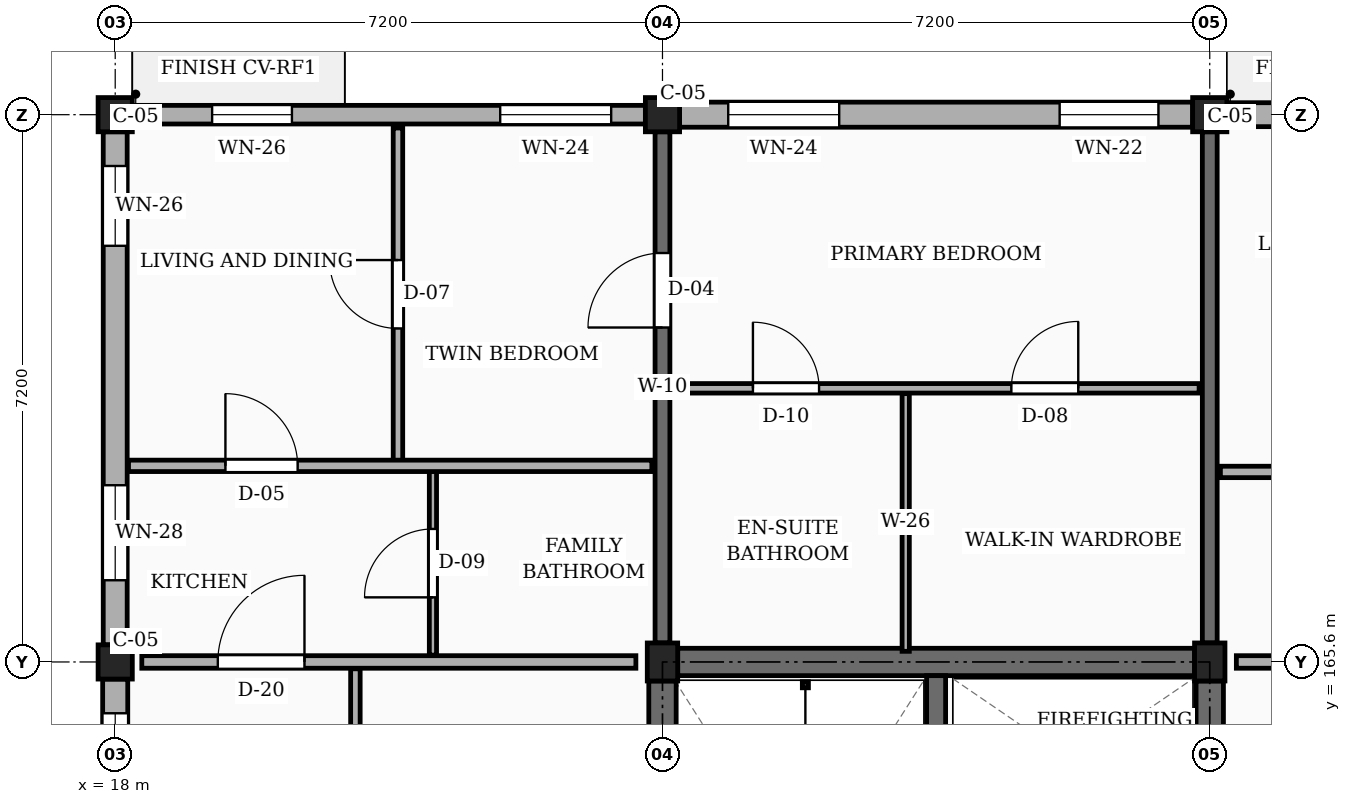
"""IFC4 building model, lengths in metres.
Left out: names, types, materials, properties, quantities, classifications, styles, units other than length and angle.
Written with IfcOpenShell. Run it as: python <this file> out.ifc"""

import sys

from ifc_helpers import new_model, si_unit, direction, frame, frame_2d, origin, origin_2d, place, context, subcontext, project, spatial, rectangle, extrude, element, fill, save


model = new_model("IFC4")
c1 = context("Model", 3, precision=1e-05, world=origin(), true_north=direction((0.0, 1.0)))
c2 = subcontext(c1, "Body", "Model", "MODEL_VIEW")
j1 = project(units=[si_unit("LENGTHUNIT", "METRE"), si_unit("PLANEANGLEUNIT", "RADIAN")], contexts=[c1])
p1 = place(None, origin())
s1 = spatial("IfcSite", under=j1, at=p1, CompositionType="ELEMENT")
p2 = place(p1, origin())
s2 = spatial("IfcBuilding", under=s1, at=p2, CompositionType="ELEMENT")
p3 = place(p2, frame((0.0, 0.0, 42.3)))
s3 = spatial("IfcBuildingStorey", under=s2, at=p3, CompositionType="ELEMENT", Elevation=42.3)
for number, where, z_axis, x_axis in (
    (1, (18.0, 165.6, 0.0), (0.0, 0.0, 1.0), (1.0, 0.0, 0.0)),
    (2, (18.0, 172.8, 0.0), (0.0, 0.0, 1.0), (1.0, 0.0, 0.0)),
):
    element("IfcColumn", number, at=place(p3, frame(where, z_axis=z_axis, x_axis=x_axis)), inside=s3, PredefinedType="COLUMN", context=c2, shape_type="SweptSolid", body=[
        extrude(rectangle(XDim=0.45, YDim=0.45, at=origin_2d()), origin(), (0.0, 0.0, 1.0), 3.15),
    ])
p4 = place(p3, frame((25.2, 165.6, 0.0), z_axis=(0.0, 0.0, 1.0), x_axis=(1.0, 0.0, 0.0)))
e3 = element("IfcColumn", 3, at=p4, inside=s3, PredefinedType="COLUMN", context=c2, shape_type="SweptSolid", body=[
    extrude(rectangle(XDim=0.4, YDim=0.5, at=origin_2d()), origin(), (0.0, 0.0, 1.0), 3.15),
])
p5 = place(p3, frame((25.2, 172.8, 0.0), z_axis=(0.0, 0.0, 1.0), x_axis=(1.0, 0.0, 0.0)))
e4 = element("IfcColumn", 4, at=p5, inside=s3, PredefinedType="COLUMN", context=c2, shape_type="SweptSolid", body=[
    extrude(rectangle(XDim=0.45, YDim=0.45, at=origin_2d()), origin(), (0.0, 0.0, 1.0), 3.15),
])
p6 = place(p3, frame((32.4, 165.6, 0.0), z_axis=(0.0, 0.0, 1.0), x_axis=(1.0, 0.0, 0.0)))
e5 = element("IfcColumn", 5, at=p6, inside=s3, PredefinedType="COLUMN", context=c2, shape_type="SweptSolid", body=[
    extrude(rectangle(XDim=0.4, YDim=0.5, at=origin_2d()), origin(), (0.0, 0.0, 1.0), 3.15),
])
p7 = place(p3, frame((32.4, 172.8, 0.0), z_axis=(0.0, 0.0, 1.0), x_axis=(1.0, 0.0, 0.0)))
e6 = element("IfcColumn", 6, at=p7, inside=s3, PredefinedType="COLUMN", context=c2, shape_type="SweptSolid", body=[
    extrude(rectangle(XDim=0.45, YDim=0.45, at=origin_2d()), origin(), (0.0, 0.0, 1.0), 3.15),
])
p8 = place(p3, frame((25.2, 165.85, 0.0), z_axis=(0.0, 0.0, 1.0), x_axis=(0.0, 1.0, 0.0)))
e7 = element("IfcWall", 7, at=p8, inside=s3, PredefinedType="SOLIDWALL", context=c2, shape_type="SweptSolid", body=[
    extrude(rectangle(XDim=6.725, YDim=0.195, at=frame_2d((3.362, 0.0))), origin(), (0.0, 0.0, 1.0), 2.22),
])
p9 = place(p8, frame((4.15, 0.0, 0.0)))
e8 = element("IfcOpeningElement", 8, at=p9, cuts=e7, PredefinedType="OPENING", context=c2, shape_type="SweptSolid", body=[
    extrude(rectangle(XDim=0.98, YDim=2.12, at=frame_2d((0.49, 1.06))), frame((0.0, 0.107, 0.0), z_axis=(0.0, -1.0, 0.0), x_axis=(1.0, 0.0, 0.0)), (0.0, 0.0, 1.0), 0.215),
])
p10 = place(p3, frame((32.4, 165.85, 0.0), z_axis=(0.0, 0.0, 1.0), x_axis=(0.0, 1.0, 0.0)))
e9 = element("IfcWall", 9, at=p10, inside=s3, PredefinedType="SOLIDWALL", context=c2, shape_type="SweptSolid", body=[
    extrude(rectangle(XDim=6.725, YDim=0.195, at=frame_2d((3.362, 0.0))), origin(), (0.0, 0.0, 1.0), 2.22),
])
p11 = place(p3, frame((39.375, 172.8, 0.0), z_axis=(0.0, 0.0, 1.0), x_axis=(-1.0, 0.0, 0.0)))
e10 = element("IfcWall", 10, at=p11, inside=s3, PredefinedType="SOLIDWALL", context=c2, shape_type="SweptSolid", body=[
    extrude(rectangle(XDim=6.75, YDim=0.315, at=frame_2d((3.375, 0.0))), origin(), (0.0, 0.0, 1.0), 2.46),
])
p12 = place(p11, frame((0.45, 0.0, 0.78)))
e11 = element("IfcOpeningElement", 11, at=p12, cuts=e10, PredefinedType="OPENING", context=c2, shape_type="SweptSolid", body=[
    extrude(rectangle(XDim=1.14, YDim=1.36, at=frame_2d((0.57, 0.68))), frame((0.0, 0.167, 0.0), z_axis=(0.0, -1.0, 0.0), x_axis=(1.0, 0.0, 0.0)), (0.0, 0.0, 1.0), 0.335),
])
p13 = place(p11, frame((4.65, 0.0, 0.78)))
e12 = element("IfcOpeningElement", 12, at=p13, cuts=e10, PredefinedType="OPENING", context=c2, shape_type="SweptSolid", body=[
    extrude(rectangle(XDim=1.3, YDim=1.36, at=frame_2d((0.65, 0.68))), frame((0.0, 0.167, 0.0), z_axis=(0.0, -1.0, 0.0), x_axis=(1.0, 0.0, 0.0)), (0.0, 0.0, 1.0), 0.335),
])
p14 = place(p3, frame((32.175, 172.8, 0.0), z_axis=(0.0, 0.0, 1.0), x_axis=(-1.0, 0.0, 0.0)))
e13 = element("IfcWall", 13, at=p14, inside=s3, PredefinedType="SOLIDWALL", context=c2, shape_type="SweptSolid", body=[
    extrude(rectangle(XDim=6.75, YDim=0.33, at=frame_2d((3.375, 0.0))), origin(), (0.0, 0.0, 1.0), 2.46),
])
p15 = place(p14, frame((0.45, 0.0, 0.78)))
e14 = element("IfcOpeningElement", 14, at=p15, cuts=e13, PredefinedType="OPENING", context=c2, shape_type="SweptSolid", body=[
    extrude(rectangle(XDim=1.3, YDim=1.36, at=frame_2d((0.65, 0.68))), frame((0.0, 0.175, 0.0), z_axis=(0.0, -1.0, 0.0), x_axis=(1.0, 0.0, 0.0)), (0.0, 0.0, 1.0), 0.35),
])
p16 = place(p14, frame((4.65, 0.0, 0.78)))
e15 = element("IfcOpeningElement", 15, at=p16, cuts=e13, PredefinedType="OPENING", context=c2, shape_type="SweptSolid", body=[
    extrude(rectangle(XDim=1.46, YDim=1.36, at=frame_2d((0.73, 0.68))), frame((0.0, 0.175, 0.0), z_axis=(0.0, -1.0, 0.0), x_axis=(1.0, 0.0, 0.0)), (0.0, 0.0, 1.0), 0.35),
])
p17 = place(p3, frame((24.975, 172.8, 0.0), z_axis=(0.0, 0.0, 1.0), x_axis=(-1.0, 0.0, 0.0)))
e16 = element("IfcWall", 16, at=p17, inside=s3, PredefinedType="SOLIDWALL", context=c2, shape_type="SweptSolid", body=[
    extrude(rectangle(XDim=6.75, YDim=0.245, at=frame_2d((3.375, 0.0))), origin(), (0.0, 0.0, 1.0), 2.46),
])
p18 = place(p17, frame((0.45, 0.0, 0.78)))
e17 = element("IfcOpeningElement", 17, at=p18, cuts=e16, PredefinedType="OPENING", context=c2, shape_type="SweptSolid", body=[
    extrude(rectangle(XDim=1.46, YDim=1.36, at=frame_2d((0.73, 0.68))), frame((0.0, 0.133, 0.0), z_axis=(0.0, -1.0, 0.0), x_axis=(1.0, 0.0, 0.0)), (0.0, 0.0, 1.0), 0.265),
])
p19 = place(p17, frame((4.65, 0.0, 0.78)))
e18 = element("IfcOpeningElement", 18, at=p19, cuts=e16, PredefinedType="OPENING", context=c2, shape_type="SweptSolid", body=[
    extrude(rectangle(XDim=1.05, YDim=1.44, at=frame_2d((0.525, 0.72))), frame((0.0, 0.133, 0.0), z_axis=(0.0, -1.0, 0.0), x_axis=(1.0, 0.0, 0.0)), (0.0, 0.0, 1.0), 0.265),
])
p20 = place(p3, frame((18.0, 172.575, 0.0), z_axis=(0.0, 0.0, 1.0), x_axis=(0.0, -1.0, 0.0)))
e19 = element("IfcWall", 19, at=p20, inside=s3, PredefinedType="SOLIDWALL", context=c2, shape_type="SweptSolid", body=[
    extrude(rectangle(XDim=6.75, YDim=0.315, at=frame_2d((3.375, 0.0))), origin(), (0.0, 0.0, 1.0), 2.46),
])
p21 = place(p20, frame((0.45, 0.0, 0.78)))
e20 = element("IfcOpeningElement", 20, at=p21, cuts=e19, PredefinedType="OPENING", context=c2, shape_type="SweptSolid", body=[
    extrude(rectangle(XDim=1.05, YDim=1.44, at=frame_2d((0.525, 0.72))), frame((0.0, 0.167, 0.0), z_axis=(0.0, -1.0, 0.0), x_axis=(1.0, 0.0, 0.0)), (0.0, 0.0, 1.0), 0.335),
])
p22 = place(p20, frame((4.65, 0.0, 0.78)))
e21 = element("IfcOpeningElement", 21, at=p22, cuts=e19, PredefinedType="OPENING", context=c2, shape_type="SweptSolid", body=[
    extrude(rectangle(XDim=1.25, YDim=1.44, at=frame_2d((0.625, 0.72))), frame((0.0, 0.167, 0.0), z_axis=(0.0, -1.0, 0.0), x_axis=(1.0, 0.0, 0.0)), (0.0, 0.0, 1.0), 0.335),
])
p23 = place(p3, frame((18.0, 165.375, 0.0), z_axis=(0.0, 0.0, 1.0), x_axis=(0.0, -1.0, 0.0)))
e22 = element("IfcWall", 22, at=p23, inside=s3, PredefinedType="SOLIDWALL", context=c2, shape_type="SweptSolid", body=[
    extrude(rectangle(XDim=6.75, YDim=0.33, at=frame_2d((3.375, 0.0))), origin(), (0.0, 0.0, 1.0), 2.46),
])
p24 = place(p23, frame((0.45, 0.0, 0.78)))
e23 = element("IfcOpeningElement", 23, at=p24, cuts=e22, PredefinedType="OPENING", context=c2, shape_type="SweptSolid", body=[
    extrude(rectangle(XDim=1.25, YDim=1.44, at=frame_2d((0.625, 0.72))), frame((0.0, 0.175, 0.0), z_axis=(0.0, -1.0, 0.0), x_axis=(1.0, 0.0, 0.0)), (0.0, 0.0, 1.0), 0.35),
])
p25 = place(p23, frame((4.65, 0.0, 0.78)))
e24 = element("IfcOpeningElement", 24, at=p25, cuts=e22, PredefinedType="OPENING", context=c2, shape_type="SweptSolid", body=[
    extrude(rectangle(XDim=1.45, YDim=1.44, at=frame_2d((0.725, 0.72))), frame((0.0, 0.175, 0.0), z_axis=(0.0, -1.0, 0.0), x_axis=(1.0, 0.0, 0.0)), (0.0, 0.0, 1.0), 0.35),
])
p26 = place(p3, frame((25.2, 158.65, 0.0), z_axis=(0.0, 0.0, 1.0), x_axis=(0.0, 1.0, 0.0)))
e25 = element("IfcWall", 25, at=p26, inside=s3, PredefinedType="SHEAR", context=c2, shape_type="SweptSolid", body=[
    extrude(rectangle(XDim=6.7, YDim=0.36, at=frame_2d((3.35, 0.0))), origin(), (0.0, 0.0, 1.0), 2.89),
])
p27 = place(p3, frame((25.4, 165.6, 0.0), z_axis=(0.0, 0.0, 1.0), x_axis=(1.0, 0.0, 0.0)))
e26 = element("IfcWall", 26, at=p27, inside=s3, PredefinedType="SHEAR", context=c2, shape_type="SweptSolid", body=[
    extrude(rectangle(XDim=6.8, YDim=0.36, at=frame_2d((3.4, 0.0))), origin(), (0.0, 0.0, 1.0), 2.89),
])
p28 = place(p3, frame((32.4, 158.65, 0.0), z_axis=(0.0, 0.0, 1.0), x_axis=(0.0, 1.0, 0.0)))
e27 = element("IfcWall", 27, at=p28, inside=s3, PredefinedType="SHEAR", context=c2, shape_type="SweptSolid", body=[
    extrude(rectangle(XDim=6.7, YDim=0.36, at=frame_2d((3.35, 0.0))), origin(), (0.0, 0.0, 1.0), 2.89),
])
p29 = place(p3, frame((28.8, 158.58, 0.0), z_axis=(0.0, 0.0, 1.0), x_axis=(0.0, 1.0, 0.0)))
e28 = element("IfcWall", 28, at=p29, inside=s3, PredefinedType="SHEAR", context=c2, shape_type="SweptSolid", body=[
    extrude(rectangle(XDim=6.84, YDim=0.25, at=frame_2d((3.42, 0.0))), origin(), (0.0, 0.0, 1.0), 2.89),
])
p30 = place(p29, frame((0.42, 0.0, 0.0)))
e29 = element("IfcOpeningElement", 29, at=p30, cuts=e28, PredefinedType="OPENING", context=c2, shape_type="SweptSolid", body=[
    extrude(rectangle(XDim=1.05, YDim=2.15, at=frame_2d((0.525, 1.075))), frame((0.0, 0.135, 0.0), z_axis=(0.0, -1.0, 0.0), x_axis=(1.0, 0.0, 0.0)), (0.0, 0.0, 1.0), 0.27),
])
p31 = place(p3, frame((18.35, 165.6, 0.0), z_axis=(0.0, 0.0, 1.0), x_axis=(1.0, 0.0, 0.0)))
e30 = element("IfcWall", 30, at=p31, inside=s3, PredefinedType="PARTITIONING", context=c2, shape_type="SweptSolid", body=[
    extrude(rectangle(XDim=6.5, YDim=0.165, at=frame_2d((3.25, 0.0))), origin(), (0.0, 0.0, 1.0), 2.325),
])
p32 = place(p31, frame((1.0, 0.0, 0.0)))
e31 = element("IfcOpeningElement", 31, at=p32, cuts=e30, PredefinedType="OPENING", context=c2, shape_type="SweptSolid", body=[
    extrude(rectangle(XDim=1.14, YDim=2.18, at=frame_2d((0.57, 1.09))), frame((0.0, 0.093, 0.0), z_axis=(0.0, -1.0, 0.0), x_axis=(1.0, 0.0, 0.0)), (0.0, 0.0, 1.0), 0.185),
])
p33 = place(p3, frame((32.75, 165.6, 0.0), z_axis=(0.0, 0.0, 1.0), x_axis=(1.0, 0.0, 0.0)))
e32 = element("IfcWall", 32, at=p33, inside=s3, PredefinedType="PARTITIONING", context=c2, shape_type="SweptSolid", body=[
    extrude(rectangle(XDim=6.5, YDim=0.165, at=frame_2d((3.25, 0.0))), origin(), (0.0, 0.0, 1.0), 2.325),
])
p34 = place(p33, frame((1.0, 0.0, 0.0)))
e33 = element("IfcOpeningElement", 33, at=p34, cuts=e32, PredefinedType="OPENING", context=c2, shape_type="SweptSolid", body=[
    extrude(rectangle(XDim=1.0, YDim=2.15, at=frame_2d((0.5, 1.075))), frame((0.0, 0.093, 0.0), z_axis=(0.0, -1.0, 0.0), x_axis=(1.0, 0.0, 0.0)), (0.0, 0.0, 1.0), 0.185),
])
p35 = place(p3, frame((21.16, 158.49, 0.0), z_axis=(0.0, 0.0, 1.0), x_axis=(0.0, 1.0, 0.0)))
e34 = element("IfcWall", 34, at=p35, inside=s3, PredefinedType="PARTITIONING", context=c2, shape_type="SweptSolid", body=[
    extrude(rectangle(XDim=7.02, YDim=0.125, at=frame_2d((3.51, 0.0))), origin(), (0.0, 0.0, 1.0), 2.325),
])
p36 = place(p35, frame((2.85, 0.0, 0.0)))
e35 = element("IfcOpeningElement", 35, at=p36, cuts=e34, PredefinedType="OPENING", context=c2, shape_type="SweptSolid", body=[
    extrude(rectangle(XDim=1.02, YDim=2.15, at=frame_2d((0.51, 1.075))), frame((0.0, 0.073, 0.0), z_axis=(0.0, -1.0, 0.0), x_axis=(1.0, 0.0, 0.0)), (0.0, 0.0, 1.0), 0.145),
])
p37 = place(p3, frame((21.72, 168.25, 0.0), z_axis=(0.0, 0.0, 1.0), x_axis=(0.0, 1.0, 0.0)))
e36 = element("IfcWall", 36, at=p37, inside=s3, PredefinedType="PARTITIONING", context=c2, shape_type="SweptSolid", body=[
    extrude(rectangle(XDim=4.375, YDim=0.125, at=frame_2d((2.188, 0.0))), origin(), (0.0, 0.0, 1.0), 2.325),
])
p38 = place(p37, frame((1.738, 0.0, 0.0)))
e37 = element("IfcOpeningElement", 37, at=p38, cuts=e36, PredefinedType="OPENING", context=c2, shape_type="SweptSolid", body=[
    extrude(rectangle(XDim=0.9, YDim=2.1, at=frame_2d((0.45, 1.05))), frame((0.0, 0.073, 0.0), z_axis=(0.0, -1.0, 0.0), x_axis=(1.0, 0.0, 0.0)), (0.0, 0.0, 1.0), 0.145),
])
p39 = place(p3, frame((22.18, 165.69, 0.0), z_axis=(0.0, 0.0, 1.0), x_axis=(0.0, 1.0, 0.0)))
e38 = element("IfcWall", 38, at=p39, inside=s3, PredefinedType="PARTITIONING", context=c2, shape_type="SweptSolid", body=[
    extrude(rectangle(XDim=2.42, YDim=0.095, at=frame_2d((1.21, 0.0))), origin(), (0.0, 0.0, 1.0), 2.325),
])
p40 = place(p39, frame((0.76, 0.0, 0.0)))
e39 = element("IfcOpeningElement", 39, at=p40, cuts=e38, PredefinedType="OPENING", context=c2, shape_type="SweptSolid", body=[
    extrude(rectangle(XDim=0.9, YDim=2.05, at=frame_2d((0.45, 1.025))), frame((0.0, 0.058, 0.0), z_axis=(0.0, -1.0, 0.0), x_axis=(1.0, 0.0, 0.0)), (0.0, 0.0, 1.0), 0.115),
])
p41 = place(p3, frame((18.175, 168.18, 0.0), z_axis=(0.0, 0.0, 1.0), x_axis=(1.0, 0.0, 0.0)))
e40 = element("IfcWall", 40, at=p41, inside=s3, PredefinedType="PARTITIONING", context=c2, shape_type="SweptSolid", body=[
    extrude(rectangle(XDim=6.885, YDim=0.15, at=frame_2d((3.442, 0.0))), origin(), (0.0, 0.0, 1.0), 2.325),
])
p42 = place(p41, frame((1.275, 0.0, 0.0)))
e41 = element("IfcOpeningElement", 41, at=p42, cuts=e40, PredefinedType="OPENING", context=c2, shape_type="SweptSolid", body=[
    extrude(rectangle(XDim=0.95, YDim=2.1, at=frame_2d((0.475, 1.05))), frame((0.0, 0.085, 0.0), z_axis=(0.0, -1.0, 0.0), x_axis=(1.0, 0.0, 0.0)), (0.0, 0.0, 1.0), 0.17),
])
p43 = place(p3, frame((25.34, 169.2, 0.0), z_axis=(0.0, 0.0, 1.0), x_axis=(1.0, 0.0, 0.0)))
e42 = element("IfcWall", 42, at=p43, inside=s3, PredefinedType="PARTITIONING", context=c2, shape_type="SweptSolid", body=[
    extrude(rectangle(XDim=6.92, YDim=0.125, at=frame_2d((3.46, 0.0))), origin(), (0.0, 0.0, 1.0), 2.325),
])
p44 = place(p43, frame((1.05, 0.0, 0.0)))
e43 = element("IfcOpeningElement", 43, at=p44, cuts=e42, PredefinedType="OPENING", context=c2, shape_type="SweptSolid", body=[
    extrude(rectangle(XDim=0.87, YDim=2.05, at=frame_2d((0.435, 1.025))), frame((0.0, 0.073, 0.0), z_axis=(0.0, -1.0, 0.0), x_axis=(1.0, 0.0, 0.0)), (0.0, 0.0, 1.0), 0.145),
])
p45 = place(p43, frame((4.45, 0.0, 0.0)))
e44 = element("IfcOpeningElement", 44, at=p45, cuts=e42, PredefinedType="OPENING", context=c2, shape_type="SweptSolid", body=[
    extrude(rectangle(XDim=0.88, YDim=2.08, at=frame_2d((0.44, 1.04))), frame((0.0, 0.073, 0.0), z_axis=(0.0, -1.0, 0.0), x_axis=(1.0, 0.0, 0.0)), (0.0, 0.0, 1.0), 0.145),
])
p46 = place(p3, frame((28.4, 165.74, 0.0), z_axis=(0.0, 0.0, 1.0), x_axis=(0.0, 1.0, 0.0)))
e45 = element("IfcWall", 45, at=p46, inside=s3, PredefinedType="PARTITIONING", context=c2, shape_type="SweptSolid", body=[
    extrude(rectangle(XDim=3.39, YDim=0.095, at=frame_2d((1.695, 0.0))), origin(), (0.0, 0.0, 1.0), 2.325),
])
p47 = place(p3, frame((32.54, 168.1, 0.0), z_axis=(0.0, 0.0, 1.0), x_axis=(1.0, 0.0, 0.0)))
e46 = element("IfcWall", 46, at=p47, inside=s3, PredefinedType="PARTITIONING", context=c2, shape_type="SweptSolid", body=[
    extrude(rectangle(XDim=6.92, YDim=0.15, at=frame_2d((3.46, 0.0))), origin(), (0.0, 0.0, 1.0), 2.325),
])
p48 = place(p47, frame((1.31, 0.0, 0.0)))
e47 = element("IfcOpeningElement", 47, at=p48, cuts=e46, PredefinedType="OPENING", context=c2, shape_type="SweptSolid", body=[
    extrude(rectangle(XDim=0.95, YDim=2.1, at=frame_2d((0.475, 1.05))), frame((0.0, 0.085, 0.0), z_axis=(0.0, -1.0, 0.0), x_axis=(1.0, 0.0, 0.0)), (0.0, 0.0, 1.0), 0.17),
])
p49 = place(p15, origin())
e48 = element("IfcWindow", 48, at=p49, inside=s3, PartitioningType="SINGLE_PANEL", PredefinedType="WINDOW", context=c2, shape_type="SweptSolid", body=[
    extrude(rectangle(XDim=1.3, YDim=1.36, at=frame_2d((0.65, 0.68))), frame((0.0, 0.03, 0.0), z_axis=(0.0, -1.0, 0.0), x_axis=(1.0, 0.0, 0.0)), (0.0, 0.0, 1.0), 0.06),
])
fill(e14, e48)
p50 = place(p16, origin())
e49 = element("IfcWindow", 49, at=p50, inside=s3, PartitioningType="SINGLE_PANEL", PredefinedType="WINDOW", context=c2, shape_type="SweptSolid", body=[
    extrude(rectangle(XDim=1.46, YDim=1.36, at=frame_2d((0.73, 0.68))), frame((0.0, 0.03, 0.0), z_axis=(0.0, -1.0, 0.0), x_axis=(1.0, 0.0, 0.0)), (0.0, 0.0, 1.0), 0.06),
])
fill(e15, e49)
p51 = place(p18, origin())
e50 = element("IfcWindow", 50, at=p51, inside=s3, PartitioningType="SINGLE_PANEL", PredefinedType="WINDOW", context=c2, shape_type="SweptSolid", body=[
    extrude(rectangle(XDim=1.46, YDim=1.36, at=frame_2d((0.73, 0.68))), frame((0.0, 0.03, 0.0), z_axis=(0.0, -1.0, 0.0), x_axis=(1.0, 0.0, 0.0)), (0.0, 0.0, 1.0), 0.06),
])
fill(e17, e50)
p52 = place(p19, origin())
e51 = element("IfcWindow", 51, at=p52, inside=s3, PartitioningType="SINGLE_PANEL", PredefinedType="WINDOW", context=c2, shape_type="SweptSolid", body=[
    extrude(rectangle(XDim=1.05, YDim=1.44, at=frame_2d((0.525, 0.72))), frame((0.0, 0.03, 0.0), z_axis=(0.0, -1.0, 0.0), x_axis=(1.0, 0.0, 0.0)), (0.0, 0.0, 1.0), 0.06),
])
fill(e18, e51)
p53 = place(p21, origin())
e52 = element("IfcWindow", 52, at=p53, inside=s3, PartitioningType="SINGLE_PANEL", PredefinedType="WINDOW", context=c2, shape_type="SweptSolid", body=[
    extrude(rectangle(XDim=1.05, YDim=1.44, at=frame_2d((0.525, 0.72))), frame((0.0, 0.03, 0.0), z_axis=(0.0, -1.0, 0.0), x_axis=(1.0, 0.0, 0.0)), (0.0, 0.0, 1.0), 0.06),
])
fill(e20, e52)
p54 = place(p22, origin())
e53 = element("IfcWindow", 53, at=p54, inside=s3, PartitioningType="SINGLE_PANEL", PredefinedType="WINDOW", context=c2, shape_type="SweptSolid", body=[
    extrude(rectangle(XDim=1.25, YDim=1.44, at=frame_2d((0.625, 0.72))), frame((0.0, 0.03, 0.0), z_axis=(0.0, -1.0, 0.0), x_axis=(1.0, 0.0, 0.0)), (0.0, 0.0, 1.0), 0.06),
])
fill(e21, e53)
p55 = place(p24, origin())
e54 = element("IfcWindow", 54, at=p55, inside=s3, PartitioningType="SINGLE_PANEL", PredefinedType="WINDOW", context=c2, shape_type="SweptSolid", body=[
    extrude(rectangle(XDim=1.25, YDim=1.44, at=frame_2d((0.625, 0.72))), frame((0.0, 0.03, 0.0), z_axis=(0.0, -1.0, 0.0), x_axis=(1.0, 0.0, 0.0)), (0.0, 0.0, 1.0), 0.06),
])
fill(e23, e54)
p56 = place(p32, origin())
e55 = element("IfcDoor", 55, at=p56, inside=s3, OperationType="SINGLE_SWING_RIGHT", PredefinedType="DOOR", context=c2, shape_type="SweptSolid", body=[
    extrude(rectangle(XDim=1.14, YDim=2.18, at=frame_2d((0.57, 1.09))), frame((0.0, 0.025, 0.0), z_axis=(0.0, -1.0, 0.0), x_axis=(1.0, 0.0, 0.0)), (0.0, 0.0, 1.0), 0.05),
])
fill(e31, e55)
p57 = place(p38, origin())
e56 = element("IfcDoor", 56, at=p57, inside=s3, OperationType="SINGLE_SWING_RIGHT", PredefinedType="DOOR", context=c2, shape_type="SweptSolid", body=[
    extrude(rectangle(XDim=0.9, YDim=2.1, at=frame_2d((0.45, 1.05))), frame((0.0, 0.025, 0.0), z_axis=(0.0, -1.0, 0.0), x_axis=(1.0, 0.0, 0.0)), (0.0, 0.0, 1.0), 0.05),
])
fill(e37, e56)
p58 = place(p40, origin())
e57 = element("IfcDoor", 57, at=p58, inside=s3, OperationType="SINGLE_SWING_LEFT", PredefinedType="DOOR", context=c2, shape_type="SweptSolid", body=[
    extrude(rectangle(XDim=0.9, YDim=2.05, at=frame_2d((0.45, 1.025))), frame((0.0, 0.025, 0.0), z_axis=(0.0, -1.0, 0.0), x_axis=(1.0, 0.0, 0.0)), (0.0, 0.0, 1.0), 0.05),
])
fill(e39, e57)
p59 = place(p42, origin())
e58 = element("IfcDoor", 58, at=p59, inside=s3, OperationType="SINGLE_SWING_LEFT", PredefinedType="DOOR", context=c2, shape_type="SweptSolid", body=[
    extrude(rectangle(XDim=0.95, YDim=2.1, at=frame_2d((0.475, 1.05))), frame((0.0, 0.025, 0.0), z_axis=(0.0, -1.0, 0.0), x_axis=(1.0, 0.0, 0.0)), (0.0, 0.0, 1.0), 0.05),
])
fill(e41, e58)
p60 = place(p44, origin())
e59 = element("IfcDoor", 59, at=p60, inside=s3, OperationType="SINGLE_SWING_LEFT", PredefinedType="DOOR", context=c2, shape_type="SweptSolid", body=[
    extrude(rectangle(XDim=0.87, YDim=2.05, at=frame_2d((0.435, 1.025))), frame((0.0, 0.025, 0.0), z_axis=(0.0, -1.0, 0.0), x_axis=(1.0, 0.0, 0.0)), (0.0, 0.0, 1.0), 0.05),
])
fill(e43, e59)
p61 = place(p45, origin())
e60 = element("IfcDoor", 60, at=p61, inside=s3, OperationType="SINGLE_SWING_RIGHT", PredefinedType="DOOR", context=c2, shape_type="SweptSolid", body=[
    extrude(rectangle(XDim=0.88, YDim=2.08, at=frame_2d((0.44, 1.04))), frame((0.0, 0.025, 0.0), z_axis=(0.0, -1.0, 0.0), x_axis=(1.0, 0.0, 0.0)), (0.0, 0.0, 1.0), 0.05),
])
fill(e44, e60)
p62 = place(p9, origin())
e61 = element("IfcDoor", 61, at=p62, inside=s3, OperationType="SINGLE_SWING_LEFT", PredefinedType="DOOR", context=c2, shape_type="SweptSolid", body=[
    extrude(rectangle(XDim=0.98, YDim=2.12, at=frame_2d((0.49, 1.06))), frame((0.0, 0.025, 0.0), z_axis=(0.0, -1.0, 0.0), x_axis=(1.0, 0.0, 0.0)), (0.0, 0.0, 1.0), 0.05),
])
fill(e8, e61)
save(model, sys.argv[1])
